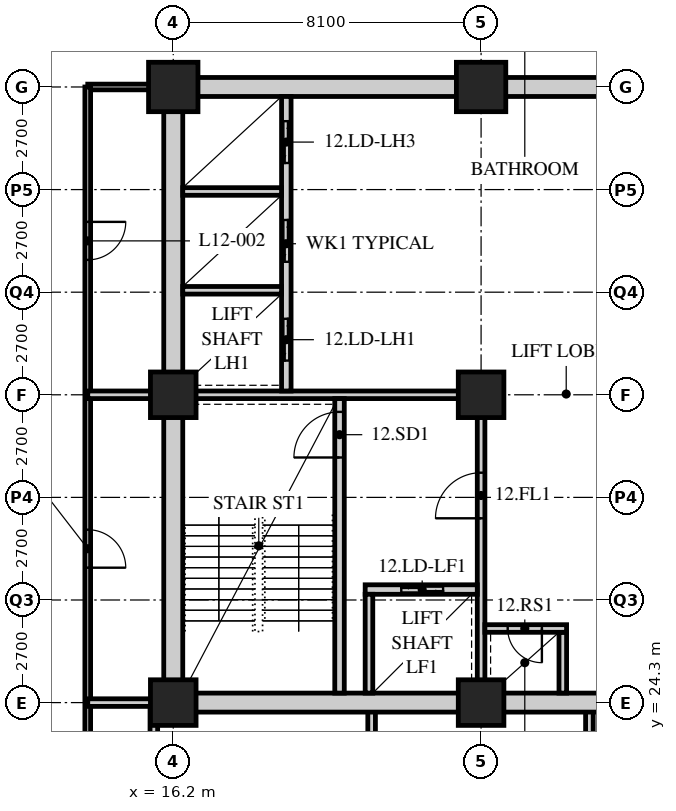
"""IFC4 building model, lengths in metres.
Left out: names, types, materials, properties, quantities, classifications, styles, units other than length and angle.
Written with IfcOpenShell. Run it as: python <this file> out.ifc"""

import sys

from ifc_helpers import new_model, si_unit, direction, frame, frame_2d, origin, origin_2d, place, context, subcontext, project, spatial, rectangle, hollow_rectangle, extrude, element, fill, save


model = new_model("IFC4")
c1 = context("Model", 3, precision=1e-05, world=origin(), true_north=direction((0.0, 1.0)))
c2 = subcontext(c1, "Body", "Model", "MODEL_VIEW")
j1 = project(units=[si_unit("LENGTHUNIT", "METRE"), si_unit("PLANEANGLEUNIT", "RADIAN")], contexts=[c1])
p1 = place(None, origin())
s1 = spatial("IfcSite", under=j1, at=p1, CompositionType="ELEMENT")
p2 = place(p1, origin())
s2 = spatial("IfcBuilding", under=s1, at=p2, CompositionType="ELEMENT")
p3 = place(p2, frame((0.0, 0.0, 53.4)))
s3 = spatial("IfcBuildingStorey", under=s2, at=p3, CompositionType="ELEMENT", Elevation=53.4)
for number, where, z_axis, x_axis in (
    (1, (16.2, 24.3, 0.0), (0.0, 0.0, 1.0), (1.0, 0.0, 0.0)),
    (2, (16.2, 32.4, 0.0), (0.0, 0.0, 1.0), (1.0, 0.0, 0.0)),
):
    element("IfcColumn", number, at=place(p3, frame(where, z_axis=z_axis, x_axis=x_axis)), inside=s3, PredefinedType="COLUMN", context=c2, shape_type="SweptSolid", body=[
        extrude(hollow_rectangle(XDim=1.2, YDim=1.2, WallThickness=0.12, at=origin_2d()), origin(), (0.0, 0.0, 1.0), 3.4),
    ])
p4 = place(p3, frame((16.2, 40.5, 0.0), z_axis=(0.0, 0.0, 1.0), x_axis=(1.0, 0.0, 0.0)))
e3 = element("IfcColumn", 3, at=p4, inside=s3, PredefinedType="COLUMN", context=c2, shape_type="SweptSolid", body=[
    extrude(hollow_rectangle(XDim=1.3, YDim=1.3, WallThickness=0.13, at=origin_2d()), origin(), (0.0, 0.0, 1.0), 3.4),
])
for number, where, z_axis, x_axis in (
    (4, (24.3, 24.3, 0.0), (0.0, 0.0, 1.0), (1.0, 0.0, 0.0)),
    (5, (24.3, 32.4, 0.0), (0.0, 0.0, 1.0), (1.0, 0.0, 0.0)),
):
    element("IfcColumn", number, at=place(p3, frame(where, z_axis=z_axis, x_axis=x_axis)), inside=s3, PredefinedType="COLUMN", context=c2, shape_type="SweptSolid", body=[
        extrude(hollow_rectangle(XDim=1.2, YDim=1.2, WallThickness=0.12, at=origin_2d()), origin(), (0.0, 0.0, 1.0), 3.4),
    ])
p5 = place(p3, frame((24.3, 40.5, 0.0), z_axis=(0.0, 0.0, 1.0), x_axis=(1.0, 0.0, 0.0)))
e6 = element("IfcColumn", 6, at=p5, inside=s3, PredefinedType="COLUMN", context=c2, shape_type="SweptSolid", body=[
    extrude(hollow_rectangle(XDim=1.3, YDim=1.3, WallThickness=0.13, at=origin_2d()), origin(), (0.0, 0.0, 1.0), 3.4),
])
p6 = place(p3, frame((16.0, 40.5, 0.0), z_axis=(0.0, 0.0, 1.0), x_axis=(-1.0, 0.0, 0.0)))
e7 = element("IfcWall", 7, at=p6, inside=s3, PredefinedType="PARTITIONING", context=c2, shape_type="SweptSolid", body=[
    extrude(rectangle(XDim=2.05, YDim=0.15, at=frame_2d((1.025, 0.0))), origin(), (0.0, 0.0, 1.0), 2.578),
])
p7 = place(p3, frame((13.95, 40.5, 0.0), z_axis=(0.0, 0.0, 1.0), x_axis=(0.0, -1.0, 0.0)))
e8 = element("IfcWall", 8, at=p7, inside=s3, PredefinedType="PARTITIONING", context=c2, shape_type="SweptSolid", body=[
    extrude(rectangle(XDim=26.55, YDim=0.15, at=frame_2d((13.275, 0.0))), origin(), (0.0, 0.0, 1.0), 3.19),
])
p8 = place(p7, frame((11.65, 0.0, 0.0)))
e9 = element("IfcOpeningElement", 9, at=p8, cuts=e8, PredefinedType="OPENING", context=c2, shape_type="SweptSolid", body=[
    extrude(rectangle(XDim=1.0, YDim=2.1, at=frame_2d((0.5, 1.05))), frame((0.0, 0.085, 0.0), z_axis=(0.0, -1.0, 0.0), x_axis=(1.0, 0.0, 0.0)), (0.0, 0.0, 1.0), 0.17),
])
p9 = place(p7, frame((3.55, 0.0, 0.0)))
e10 = element("IfcOpeningElement", 10, at=p9, cuts=e8, PredefinedType="OPENING", context=c2, shape_type="SweptSolid", body=[
    extrude(rectangle(XDim=1.0, YDim=2.1, at=frame_2d((0.5, 1.05))), frame((0.0, 0.085, 0.0), z_axis=(0.0, -1.0, 0.0), x_axis=(1.0, 0.0, 0.0)), (0.0, 0.0, 1.0), 0.17),
])
p10 = place(p3, frame((13.95, 32.4, 0.0), z_axis=(0.0, 0.0, 1.0), x_axis=(1.0, 0.0, 0.0)))
e11 = element("IfcWall", 11, at=p10, inside=s3, PredefinedType="SOLIDWALL", context=c2, shape_type="SweptSolid", body=[
    extrude(rectangle(XDim=2.25, YDim=0.2, at=frame_2d((1.125, 0.0))), origin(), (0.0, 0.0, 1.0), 2.578),
])
for number, where, z_axis, x_axis in (
    (12, (15.689, 13.95, 0.0), (0.0, 0.0, 1.0), (0.0, 1.0, 0.0)),
    (13, (21.42, 13.95, 0.0), (0.0, 0.0, 1.0), (0.0, 1.0, 0.0)),
    (14, (27.15, 13.95, 0.0), (0.0, 0.0, 1.0), (0.0, 1.0, 0.0)),
):
    element("IfcWall", number, at=place(p3, frame(where, z_axis=z_axis, x_axis=x_axis)), inside=s3, PredefinedType="SOLIDWALL", context=c2, shape_type="SweptSolid", body=[
        extrude(rectangle(XDim=10.35, YDim=0.2, at=frame_2d((5.175, 0.0))), origin(), (0.0, 0.0, 1.0), 3.19),
    ])
p11 = place(p3, frame((13.95, 24.3, 0.0), z_axis=(0.0, 0.0, 1.0), x_axis=(1.0, 0.0, 0.0)))
e15 = element("IfcWall", 15, at=p11, inside=s3, PredefinedType="SOLIDWALL", context=c2, shape_type="SweptSolid", body=[
    extrude(rectangle(XDim=2.25, YDim=0.2, at=frame_2d((1.125, 0.0))), origin(), (0.0, 0.0, 1.0), 2.578),
])
p12 = place(p3, frame((15.95, 24.3, 0.0), z_axis=(0.0, 0.0, 1.0), x_axis=(1.0, 0.0, 0.0)))
e16 = element("IfcWall", 16, at=p12, inside=s3, PredefinedType="SOLIDWALL", context=c2, shape_type="SweptSolid", body=[
    extrude(rectangle(XDim=24.8, YDim=0.5, at=frame_2d((12.4, 0.0))), origin(), (0.0, 0.0, 1.0), 2.54),
])
p13 = place(p12, frame((11.5, 0.0, 0.0)))
e17 = element("IfcOpeningElement", 17, at=p13, cuts=e16, PredefinedType="OPENING", context=c2, shape_type="SweptSolid", body=[
    extrude(rectangle(XDim=1.8, YDim=2.4, at=frame_2d((0.9, 1.2))), frame((0.0, 0.26, 0.0), z_axis=(0.0, -1.0, 0.0), x_axis=(1.0, 0.0, 0.0)), (0.0, 0.0, 1.0), 0.52),
])
p14 = place(p3, frame((15.95, 40.5, 0.0), z_axis=(0.0, 0.0, 1.0), x_axis=(1.0, 0.0, 0.0)))
e18 = element("IfcWall", 18, at=p14, inside=s3, PredefinedType="SOLIDWALL", context=c2, shape_type="SweptSolid", body=[
    extrude(rectangle(XDim=24.8, YDim=0.5, at=frame_2d((12.4, 0.0))), origin(), (0.0, 0.0, 1.0), 2.54),
])
p15 = place(p14, frame((11.5, 0.0, 0.0)))
e19 = element("IfcOpeningElement", 19, at=p15, cuts=e18, PredefinedType="OPENING", context=c2, shape_type="SweptSolid", body=[
    extrude(rectangle(XDim=1.8, YDim=2.4, at=frame_2d((0.9, 1.2))), frame((0.0, 0.26, 0.0), z_axis=(0.0, -1.0, 0.0), x_axis=(1.0, 0.0, 0.0)), (0.0, 0.0, 1.0), 0.52),
])
p16 = place(p3, frame((16.2, 24.55, 0.0), z_axis=(0.0, 0.0, 1.0), x_axis=(0.0, 1.0, 0.0)))
e20 = element("IfcWall", 20, at=p16, inside=s3, PredefinedType="SOLIDWALL", context=c2, shape_type="SweptSolid", body=[
    extrude(rectangle(XDim=15.7, YDim=0.5, at=frame_2d((7.85, 0.0))), origin(), (0.0, 0.0, 1.0), 2.578),
])
p17 = place(p3, frame((16.45, 32.4, 0.0), z_axis=(0.0, 0.0, 1.0), x_axis=(1.0, 0.0, 0.0)))
e21 = element("IfcWall", 21, at=p17, inside=s3, PredefinedType="SOLIDWALL", context=c2, shape_type="SweptSolid", body=[
    extrude(rectangle(XDim=7.95, YDim=0.2, at=frame_2d((3.975, 0.0))), origin(), (0.0, 0.0, 1.0), 2.578),
])
p18 = place(p3, frame((24.3, 24.55, 0.0), z_axis=(0.0, 0.0, 1.0), x_axis=(0.0, 1.0, 0.0)))
e22 = element("IfcWall", 22, at=p18, inside=s3, PredefinedType="SOLIDWALL", context=c2, shape_type="SweptSolid", body=[
    extrude(rectangle(XDim=7.75, YDim=0.2, at=frame_2d((3.875, 0.0))), origin(), (0.0, 0.0, 1.0), 2.578),
])
p19 = place(p18, frame((4.6, 0.0, 0.0)))
e23 = element("IfcOpeningElement", 23, at=p19, cuts=e22, PredefinedType="OPENING", context=c2, shape_type="SweptSolid", body=[
    extrude(rectangle(XDim=1.2, YDim=2.1, at=frame_2d((0.6, 1.05))), frame((0.0, 0.11, 0.0), z_axis=(0.0, -1.0, 0.0), x_axis=(1.0, 0.0, 0.0)), (0.0, 0.0, 1.0), 0.22),
])
p20 = place(p3, frame((20.575, 24.55, 0.0), z_axis=(0.0, 0.0, 1.0), x_axis=(0.0, 1.0, 0.0)))
e24 = element("IfcWall", 24, at=p20, inside=s3, PredefinedType="SOLIDWALL", context=c2, shape_type="SweptSolid", body=[
    extrude(rectangle(XDim=7.75, YDim=0.25, at=frame_2d((3.875, 0.0))), origin(), (0.0, 0.0, 1.0), 3.19),
])
p21 = place(p20, frame((6.2, 0.0, 0.0)))
e25 = element("IfcOpeningElement", 25, at=p21, cuts=e24, PredefinedType="OPENING", context=c2, shape_type="SweptSolid", body=[
    extrude(rectangle(XDim=1.2, YDim=2.1, at=frame_2d((0.6, 1.05))), frame((0.0, 0.135, 0.0), z_axis=(0.0, -1.0, 0.0), x_axis=(1.0, 0.0, 0.0)), (0.0, 0.0, 1.0), 0.27),
])
p22 = place(p3, frame((21.25, 27.275, 0.0), z_axis=(0.0, 0.0, 1.0), x_axis=(1.0, 0.0, 0.0)))
e26 = element("IfcWall", 26, at=p22, inside=s3, PredefinedType="SOLIDWALL", context=c2, shape_type="SweptSolid", body=[
    extrude(rectangle(XDim=2.95, YDim=0.25, at=frame_2d((1.475, 0.0))), origin(), (0.0, 0.0, 1.0), 3.19),
])
p23 = place(p22, frame((0.95, 0.0, 0.0)))
e27 = element("IfcOpeningElement", 27, at=p23, cuts=e26, PredefinedType="OPENING", context=c2, shape_type="SweptSolid", body=[
    extrude(rectangle(XDim=1.1, YDim=2.4, at=frame_2d((0.55, 1.2))), frame((0.0, 0.135, 0.0), z_axis=(0.0, -1.0, 0.0), x_axis=(1.0, 0.0, 0.0)), (0.0, 0.0, 1.0), 0.27),
])
p24 = place(p3, frame((21.35, 24.55, 0.0), z_axis=(0.0, 0.0, 1.0), x_axis=(0.0, 1.0, 0.0)))
e28 = element("IfcWall", 28, at=p24, inside=s3, PredefinedType="SOLIDWALL", context=c2, shape_type="SweptSolid", body=[
    extrude(rectangle(XDim=2.6, YDim=0.2, at=frame_2d((1.3, 0.0))), origin(), (0.0, 0.0, 1.0), 3.19),
])
p25 = place(p3, frame((19.175, 32.5, 0.0), z_axis=(0.0, 0.0, 1.0), x_axis=(0.0, 1.0, 0.0)))
e29 = element("IfcWall", 29, at=p25, inside=s3, PredefinedType="SOLIDWALL", context=c2, shape_type="SweptSolid", body=[
    extrude(rectangle(XDim=7.75, YDim=0.25, at=frame_2d((3.875, 0.0))), origin(), (0.0, 0.0, 1.0), 3.19),
])
p26 = place(p25, frame((0.8, 0.0, 0.0)))
e30 = element("IfcOpeningElement", 30, at=p26, cuts=e29, PredefinedType="OPENING", context=c2, shape_type="SweptSolid", body=[
    extrude(rectangle(XDim=1.1, YDim=2.4, at=frame_2d((0.55, 1.2))), frame((0.0, 0.135, 0.0), z_axis=(0.0, -1.0, 0.0), x_axis=(1.0, 0.0, 0.0)), (0.0, 0.0, 1.0), 0.27),
])
p27 = place(p25, frame((3.4, 0.0, 0.0)))
e31 = element("IfcOpeningElement", 31, at=p27, cuts=e29, PredefinedType="OPENING", context=c2, shape_type="SweptSolid", body=[
    extrude(rectangle(XDim=1.1, YDim=2.4, at=frame_2d((0.55, 1.2))), frame((0.0, 0.135, 0.0), z_axis=(0.0, -1.0, 0.0), x_axis=(1.0, 0.0, 0.0)), (0.0, 0.0, 1.0), 0.27),
])
p28 = place(p25, frame((6.0, 0.0, 0.0)))
e32 = element("IfcOpeningElement", 32, at=p28, cuts=e29, PredefinedType="OPENING", context=c2, shape_type="SweptSolid", body=[
    extrude(rectangle(XDim=1.1, YDim=2.4, at=frame_2d((0.55, 1.2))), frame((0.0, 0.135, 0.0), z_axis=(0.0, -1.0, 0.0), x_axis=(1.0, 0.0, 0.0)), (0.0, 0.0, 1.0), 0.27),
])
for number, where, z_axis, x_axis in (
    (33, (16.45, 35.15, 0.0), (0.0, 0.0, 1.0), (1.0, 0.0, 0.0)),
    (34, (16.45, 37.75, 0.0), (0.0, 0.0, 1.0), (1.0, 0.0, 0.0)),
):
    element("IfcWall", number, at=place(p3, frame(where, z_axis=z_axis, x_axis=x_axis)), inside=s3, PredefinedType="SOLIDWALL", context=c2, shape_type="SweptSolid", body=[
        extrude(rectangle(XDim=2.6, YDim=0.2, at=frame_2d((1.3, 0.0))), origin(), (0.0, 0.0, 1.0), 3.19),
    ])
p29 = place(p3, frame((26.45, 24.55, 0.0), z_axis=(0.0, 0.0, 1.0), x_axis=(0.0, 1.0, 0.0)))
e35 = element("IfcWall", 35, at=p29, inside=s3, PredefinedType="SOLIDWALL", context=c2, shape_type="SweptSolid", body=[
    extrude(rectangle(XDim=1.6, YDim=0.2, at=frame_2d((0.8, 0.0))), origin(), (0.0, 0.0, 1.0), 3.19),
])
p30 = place(p3, frame((24.4, 26.25, 0.0), z_axis=(0.0, 0.0, 1.0), x_axis=(1.0, 0.0, 0.0)))
e36 = element("IfcWall", 36, at=p30, inside=s3, PredefinedType="SOLIDWALL", context=c2, shape_type="SweptSolid", body=[
    extrude(rectangle(XDim=2.15, YDim=0.2, at=frame_2d((1.075, 0.0))), origin(), (0.0, 0.0, 1.0), 3.19),
])
p31 = place(p30, frame((0.6, 0.0, 0.0)))
e37 = element("IfcOpeningElement", 37, at=p31, cuts=e36, PredefinedType="OPENING", context=c2, shape_type="SweptSolid", body=[
    extrude(rectangle(XDim=0.9, YDim=2.1, at=frame_2d((0.45, 1.05))), frame((0.0, 0.11, 0.0), z_axis=(0.0, -1.0, 0.0), x_axis=(1.0, 0.0, 0.0)), (0.0, 0.0, 1.0), 0.22),
])
p32 = place(p8, origin())
e38 = element("IfcDoor", 38, at=p32, inside=s3, OperationType="SINGLE_SWING_RIGHT", PredefinedType="DOOR", context=c2, shape_type="SweptSolid", body=[
    extrude(rectangle(XDim=1.0, YDim=2.1, at=frame_2d((0.5, 1.05))), frame((0.0, 0.025, 0.0), z_axis=(0.0, -1.0, 0.0), x_axis=(1.0, 0.0, 0.0)), (0.0, 0.0, 1.0), 0.05),
])
fill(e9, e38)
p33 = place(p9, origin())
e39 = element("IfcDoor", 39, at=p33, inside=s3, OperationType="SINGLE_SWING_LEFT", PredefinedType="DOOR", context=c2, shape_type="SweptSolid", body=[
    extrude(rectangle(XDim=1.0, YDim=2.1, at=frame_2d((0.5, 1.05))), frame((0.0, 0.025, 0.0), z_axis=(0.0, -1.0, 0.0), x_axis=(1.0, 0.0, 0.0)), (0.0, 0.0, 1.0), 0.05),
])
fill(e10, e39)
p34 = place(p21, origin())
e40 = element("IfcDoor", 40, at=p34, inside=s3, OperationType="SINGLE_SWING_LEFT", PredefinedType="DOOR", context=c2, shape_type="SweptSolid", body=[
    extrude(rectangle(XDim=1.2, YDim=2.1, at=frame_2d((0.6, 1.05))), frame((0.0, 0.025, 0.0), z_axis=(0.0, -1.0, 0.0), x_axis=(1.0, 0.0, 0.0)), (0.0, 0.0, 1.0), 0.05),
])
fill(e25, e40)
p35 = place(p19, origin())
e41 = element("IfcDoor", 41, at=p35, inside=s3, OperationType="SINGLE_SWING_LEFT", PredefinedType="DOOR", context=c2, shape_type="SweptSolid", body=[
    extrude(rectangle(XDim=1.2, YDim=2.1, at=frame_2d((0.6, 1.05))), frame((0.0, 0.025, 0.0), z_axis=(0.0, -1.0, 0.0), x_axis=(1.0, 0.0, 0.0)), (0.0, 0.0, 1.0), 0.05),
])
fill(e23, e41)
p36 = place(p31, origin())
e42 = element("IfcDoor", 42, at=p36, inside=s3, OperationType="SINGLE_SWING_LEFT", PredefinedType="DOOR", context=c2, shape_type="SweptSolid", body=[
    extrude(rectangle(XDim=0.9, YDim=2.1, at=frame_2d((0.45, 1.05))), frame((0.0, 0.025, 0.0), z_axis=(0.0, -1.0, 0.0), x_axis=(1.0, 0.0, 0.0)), (0.0, 0.0, 1.0), 0.05),
])
fill(e37, e42)
p37 = place(p26, origin())
e43 = element("IfcDoor", 43, at=p37, inside=s3, OperationType="DOUBLE_DOOR_SLIDING", PredefinedType="DOOR", context=c2, shape_type="SweptSolid", body=[
    extrude(rectangle(XDim=1.1, YDim=2.4, at=frame_2d((0.55, 1.2))), frame((0.0, 0.025, 0.0), z_axis=(0.0, -1.0, 0.0), x_axis=(1.0, 0.0, 0.0)), (0.0, 0.0, 1.0), 0.05),
])
fill(e30, e43)
p38 = place(p27, origin())
e44 = element("IfcDoor", 44, at=p38, inside=s3, OperationType="DOUBLE_DOOR_SLIDING", PredefinedType="DOOR", context=c2, shape_type="SweptSolid", body=[
    extrude(rectangle(XDim=1.1, YDim=2.4, at=frame_2d((0.55, 1.2))), frame((0.0, 0.025, 0.0), z_axis=(0.0, -1.0, 0.0), x_axis=(1.0, 0.0, 0.0)), (0.0, 0.0, 1.0), 0.05),
])
fill(e31, e44)
p39 = place(p28, origin())
e45 = element("IfcDoor", 45, at=p39, inside=s3, OperationType="DOUBLE_DOOR_SLIDING", PredefinedType="DOOR", context=c2, shape_type="SweptSolid", body=[
    extrude(rectangle(XDim=1.1, YDim=2.4, at=frame_2d((0.55, 1.2))), frame((0.0, 0.025, 0.0), z_axis=(0.0, -1.0, 0.0), x_axis=(1.0, 0.0, 0.0)), (0.0, 0.0, 1.0), 0.05),
])
fill(e32, e45)
p40 = place(p23, origin())
e46 = element("IfcDoor", 46, at=p40, inside=s3, OperationType="DOUBLE_DOOR_SLIDING", PredefinedType="DOOR", context=c2, shape_type="SweptSolid", body=[
    extrude(rectangle(XDim=1.1, YDim=2.4, at=frame_2d((0.55, 1.2))), frame((0.0, 0.025, 0.0), z_axis=(0.0, -1.0, 0.0), x_axis=(1.0, 0.0, 0.0)), (0.0, 0.0, 1.0), 0.05),
])
fill(e27, e46)
save(model, sys.argv[1])
